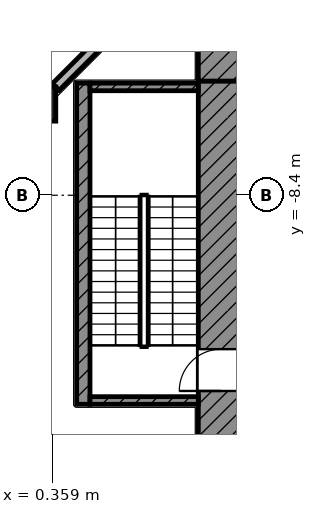
"""IFC4 building model, lengths in metres.
Left out: names, types, materials, properties, quantities, classifications, styles, units other than length and angle.
Written with IfcOpenShell. Run it as: python <this file> out.ifc"""

import sys

from ifc_helpers import new_model, si_unit, direction, frame, frame_2d, origin, origin_2d, place, context, subcontext, project, spatial, rectangle, extrude, element, fill, save


model = new_model("IFC4")
c1 = context("Model", 3, precision=1e-05, world=origin(), true_north=direction((0.0, 1.0)))
c2 = subcontext(c1, "Body", "Model", "MODEL_VIEW")
j1 = project(units=[si_unit("LENGTHUNIT", "METRE"), si_unit("PLANEANGLEUNIT", "RADIAN")], contexts=[c1])
p1 = place(None, origin())
s1 = spatial("IfcSite", under=j1, at=p1, CompositionType="ELEMENT")
p2 = place(p1, origin())
s2 = spatial("IfcBuilding", under=s1, at=p2, CompositionType="ELEMENT")
p3 = place(p2, frame((0.0, 0.0, 213.0)))
s3 = spatial("IfcBuildingStorey", under=s2, at=p3, CompositionType="ELEMENT", Elevation=213.0)
p4 = place(p3, frame((0.0, -6.0, 0.0), z_axis=(0.0, 0.0, 1.0), x_axis=(1.0, 0.0, 0.0)))
e1 = element("IfcColumn", 1, at=p4, inside=s3, PredefinedType="COLUMN", context=c2, shape_type="SweptSolid", body=[
    extrude(rectangle(XDim=0.9, YDim=0.9, at=origin_2d()), origin(), (0.0, 0.0, 1.0), 5.0),
])
p5 = place(p3, frame((5.55, -0.45, 0.0), z_axis=(0.0, 0.0, 1.0), x_axis=(-0.707106781187, -0.707106781187, 0.0)))
e2 = element("IfcWall", 2, at=p5, inside=s3, PredefinedType="SOLIDWALL", context=c2, shape_type="SweptSolid", body=[
    extrude(rectangle(XDim=7.213, YDim=0.25, at=frame_2d((3.606, 0.0))), origin(), (0.0, 0.0, 1.0), 3.2),
])
p6 = place(p3, frame((4.2, -4.8, 0.0), z_axis=(0.0, 0.0, 1.0), x_axis=(1.0, 0.0, 0.0)))
e3 = element("IfcWall", 3, at=p6, inside=s3, PredefinedType="SHEAR", context=c2, shape_type="SweptSolid", body=[
    extrude(rectangle(XDim=20.6, YDim=1.2, at=frame_2d((10.3, 0.0))), origin(), (0.0, 0.0, 1.0), 4.4),
])
p7 = place(p6, frame((1.95, 0.0, 0.0)))
e4 = element("IfcOpeningElement", 4, at=p7, cuts=e3, PredefinedType="OPENING", context=c2, shape_type="SweptSolid", body=[
    extrude(rectangle(XDim=1.1, YDim=2.1, at=frame_2d((0.55, 1.05))), frame((0.0, 0.61, 0.0), z_axis=(0.0, -1.0, 0.0), x_axis=(1.0, 0.0, 0.0)), (0.0, 0.0, 1.0), 1.22),
])
p8 = place(p6, frame((17.95, 0.0, 0.0)))
e5 = element("IfcOpeningElement", 5, at=p8, cuts=e3, PredefinedType="OPENING", context=c2, shape_type="SweptSolid", body=[
    extrude(rectangle(XDim=1.1, YDim=2.1, at=frame_2d((0.55, 1.05))), frame((0.0, 0.61, 0.0), z_axis=(0.0, -1.0, 0.0), x_axis=(1.0, 0.0, 0.0)), (0.0, 0.0, 1.0), 1.22),
])
p9 = place(p3, frame((4.8, -24.8, 0.0), z_axis=(0.0, 0.0, 1.0), x_axis=(0.0, 1.0, 0.0)))
e6 = element("IfcWall", 6, at=p9, inside=s3, PredefinedType="SHEAR", context=c2, shape_type="SweptSolid", body=[
    extrude(rectangle(XDim=19.4, YDim=1.2, at=frame_2d((9.7, 0.0))), origin(), (0.0, 0.0, 1.0), 4.4),
])
p10 = place(p9, frame((11.25, 0.0, 0.0)))
e7 = element("IfcOpeningElement", 7, at=p10, cuts=e6, PredefinedType="OPENING", context=c2, shape_type="SweptSolid", body=[
    extrude(rectangle(XDim=1.1, YDim=2.1, at=frame_2d((0.55, 1.05))), frame((0.0, 0.61, 0.0), z_axis=(0.0, -1.0, 0.0), x_axis=(1.0, 0.0, 0.0)), (0.0, 0.0, 1.0), 1.22),
])
p11 = place(p9, frame((1.95, 0.0, 0.0)))
e8 = element("IfcOpeningElement", 8, at=p11, cuts=e6, PredefinedType="OPENING", context=c2, shape_type="SweptSolid", body=[
    extrude(rectangle(XDim=1.1, YDim=2.1, at=frame_2d((0.55, 1.05))), frame((0.0, 0.61, 0.0), z_axis=(0.0, -1.0, 0.0), x_axis=(1.0, 0.0, 0.0)), (0.0, 0.0, 1.0), 1.22),
])
p12 = place(p3, frame((1.175, -13.9, 0.0), z_axis=(0.0, 0.0, 1.0), x_axis=(0.0, 1.0, 0.0)))
e9 = element("IfcWall", 9, at=p12, inside=s3, PredefinedType="SHEAR", context=c2, shape_type="SweptSolid", body=[
    extrude(rectangle(XDim=8.45, YDim=0.35, at=frame_2d((4.225, 0.0))), origin(), (0.0, 0.0, 1.0), 4.4),
])
for number, where, z_axis, x_axis in (
    (10, (1.35, -5.55, 0.0), (0.0, 0.0, 1.0), (1.0, 0.0, 0.0)),
    (11, (1.35, -13.8, 0.0), (0.0, 0.0, 1.0), (1.0, 0.0, 0.0)),
):
    element("IfcWall", number, at=place(p3, frame(where, z_axis=z_axis, x_axis=x_axis)), inside=s3, PredefinedType="SHEAR", context=c2, shape_type="SweptSolid", body=[
        extrude(rectangle(XDim=2.85, YDim=0.2, at=frame_2d((1.425, 0.0))), origin(), (0.0, 0.0, 1.0), 4.4),
    ])
p13 = place(p10, origin())
e12 = element("IfcDoor", 12, at=p13, inside=s3, OperationType="SINGLE_SWING_LEFT", PredefinedType="DOOR", context=c2, shape_type="SweptSolid", body=[
    extrude(rectangle(XDim=1.1, YDim=2.1, at=frame_2d((0.55, 1.05))), frame((0.0, 0.025, 0.0), z_axis=(0.0, -1.0, 0.0), x_axis=(1.0, 0.0, 0.0)), (0.0, 0.0, 1.0), 0.05),
])
fill(e7, e12)
save(model, sys.argv[1])
